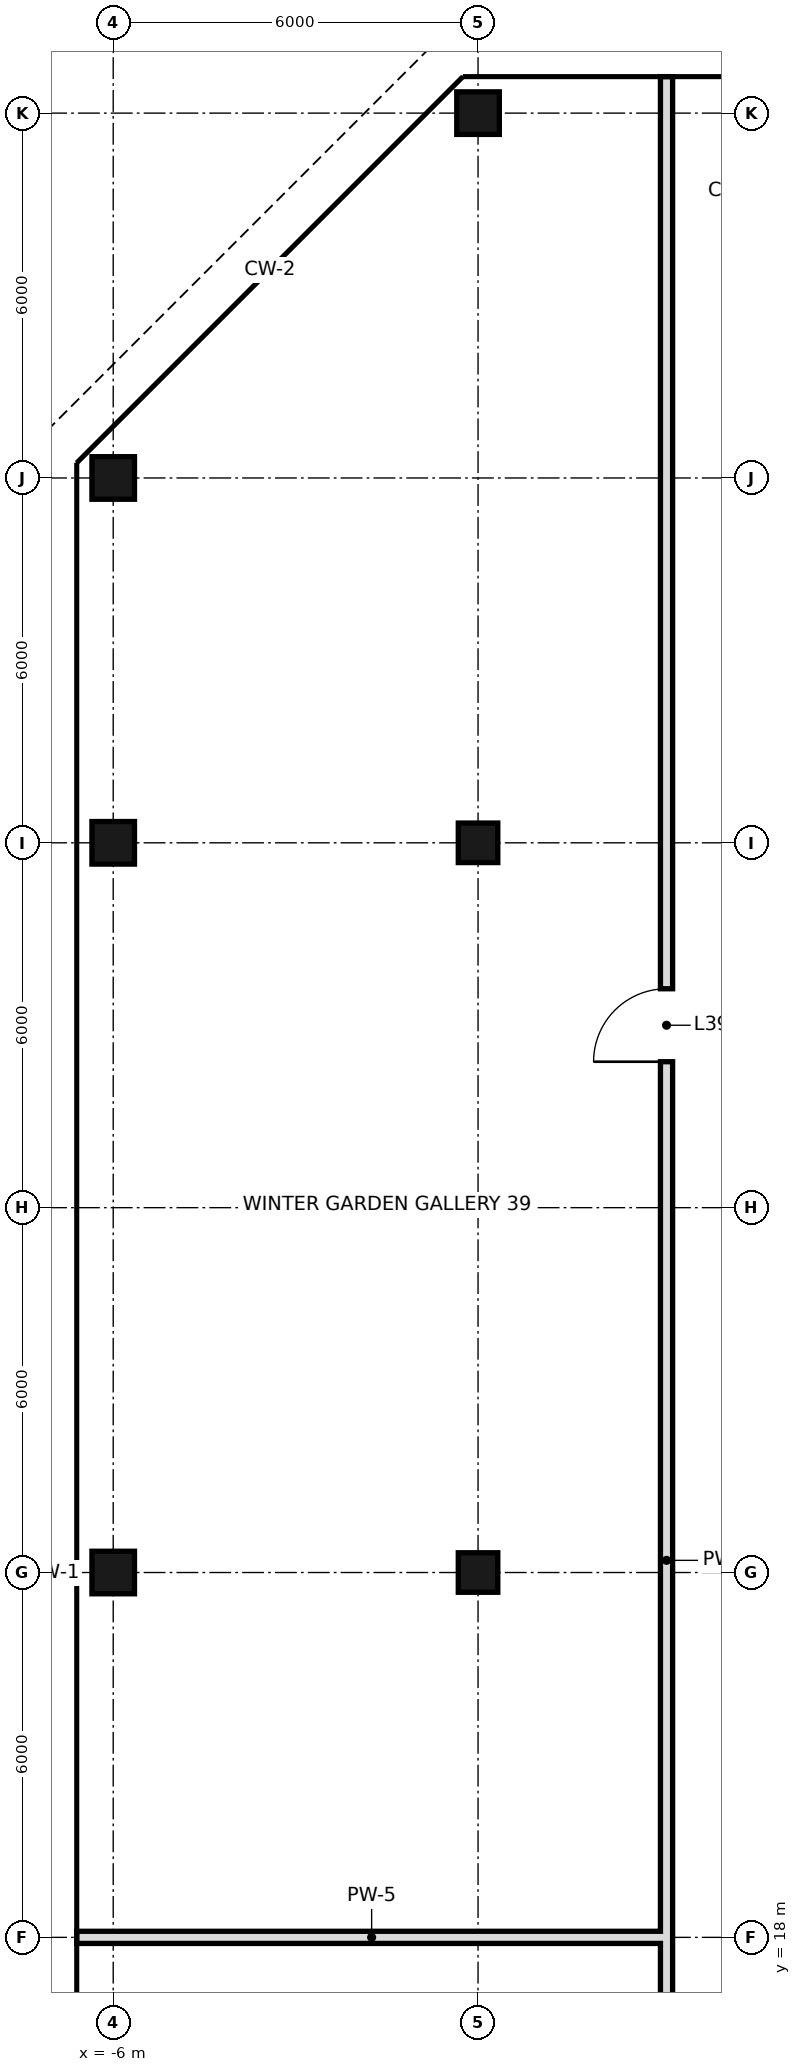
"""IFC4 building model, lengths in metres.
Left out: names, types, materials, properties, quantities, classifications, styles, units other than length and angle.
Written with IfcOpenShell. Run it as: python <this file> out.ifc"""

import sys

from ifc_helpers import new_model, si_unit, direction, frame, frame_2d, origin, origin_2d, place, context, subcontext, project, spatial, rectangle, hollow_rectangle, extrude, element, fill, save


model = new_model("IFC4")
c1 = context("Model", 3, precision=1e-05, world=origin(), true_north=direction((0.0, 1.0)))
c2 = subcontext(c1, "Body", "Model", "MODEL_VIEW")
j1 = project(units=[si_unit("LENGTHUNIT", "METRE"), si_unit("PLANEANGLEUNIT", "RADIAN")], contexts=[c1])
p1 = place(None, origin())
s1 = spatial("IfcSite", under=j1, at=p1, CompositionType="ELEMENT")
p2 = place(p1, origin())
s2 = spatial("IfcBuilding", under=s1, at=p2, CompositionType="ELEMENT")
p3 = place(p2, frame((0.0, 0.0, 170.8)))
s3 = spatial("IfcBuildingStorey", under=s2, at=p3, CompositionType="ELEMENT", Elevation=170.8)
for number, where, z_axis, x_axis in (
    (1, (-6.0, 24.0, 0.0), (0.0, 0.0, 1.0), (1.0, 0.0, 0.0)),
    (2, (-6.0, 36.0, 0.0), (0.0, 0.0, 1.0), (1.0, 0.0, 0.0)),
    (3, (-6.0, 42.0, 0.0), (0.0, 0.0, 1.0), (1.0, 0.0, 0.0)),
):
    element("IfcColumn", number, at=place(p3, frame(where, z_axis=z_axis, x_axis=x_axis)), inside=s3, PredefinedType="COLUMN", context=c2, shape_type="SweptSolid", body=[
        extrude(hollow_rectangle(XDim=0.7, YDim=0.7, WallThickness=0.036, at=origin_2d()), origin(), (0.0, 0.0, 1.0), 3.6),
    ])
for number, where, z_axis, x_axis in (
    (4, (0.0, 24.0, 0.0), (0.0, 0.0, 1.0), (1.0, 0.0, 0.0)),
    (5, (0.0, 36.0, 0.0), (0.0, 0.0, 1.0), (1.0, 0.0, 0.0)),
):
    element("IfcColumn", number, at=place(p3, frame(where, z_axis=z_axis, x_axis=x_axis)), inside=s3, PredefinedType="COLUMN", context=c2, shape_type="SweptSolid", body=[
        extrude(hollow_rectangle(XDim=0.65, YDim=0.65, WallThickness=0.032, at=origin_2d()), origin(), (0.0, 0.0, 1.0), 3.6),
    ])
p4 = place(p3, frame((0.0, 48.0, 0.0), z_axis=(0.0, 0.0, 1.0), x_axis=(1.0, 0.0, 0.0)))
e6 = element("IfcColumn", 6, at=p4, inside=s3, PredefinedType="COLUMN", context=c2, shape_type="SweptSolid", body=[
    extrude(hollow_rectangle(XDim=0.7, YDim=0.7, WallThickness=0.036, at=origin_2d()), origin(), (0.0, 0.0, 1.0), 3.6),
])
p5 = place(p3, frame((3.1, 15.3, 0.0), z_axis=(0.0, 0.0, 1.0), x_axis=(0.0, 1.0, 0.0)))
e7 = element("IfcWall", 7, at=p5, inside=s3, PredefinedType="SOLIDWALL", context=c2, shape_type="SweptSolid", body=[
    extrude(rectangle(XDim=33.3, YDim=0.2, at=frame_2d((16.65, 0.0))), origin(), (0.0, 0.0, 1.0), 2.72),
])
p6 = place(p5, frame((17.1, 0.0, 0.0)))
e8 = element("IfcOpeningElement", 8, at=p6, cuts=e7, PredefinedType="OPENING", context=c2, shape_type="SweptSolid", body=[
    extrude(rectangle(XDim=1.2, YDim=2.4, at=frame_2d((0.6, 1.2))), frame((0.0, 0.11, 0.0), z_axis=(0.0, -1.0, 0.0), x_axis=(1.0, 0.0, 0.0)), (0.0, 0.0, 1.0), 0.22),
])
p7 = place(p3, frame((-6.6, 18.0, 0.0), z_axis=(0.0, 0.0, 1.0), x_axis=(1.0, 0.0, 0.0)))
e9 = element("IfcWall", 9, at=p7, inside=s3, PredefinedType="SOLIDWALL", context=c2, shape_type="SweptSolid", body=[
    extrude(rectangle(XDim=9.7, YDim=0.2, at=frame_2d((4.85, 0.0))), origin(), (0.0, 0.0, 1.0), 2.72),
])
p8 = place(p6, origin())
e10 = element("IfcDoor", 10, at=p8, inside=s3, OperationType="SINGLE_SWING_LEFT", PredefinedType="DOOR", context=c2, shape_type="SweptSolid", body=[
    extrude(rectangle(XDim=1.2, YDim=2.4, at=frame_2d((0.6, 1.2))), frame((0.0, 0.025, 0.0), z_axis=(0.0, -1.0, 0.0), x_axis=(1.0, 0.0, 0.0)), (0.0, 0.0, 1.0), 0.05),
])
fill(e8, e10)
save(model, sys.argv[1])
